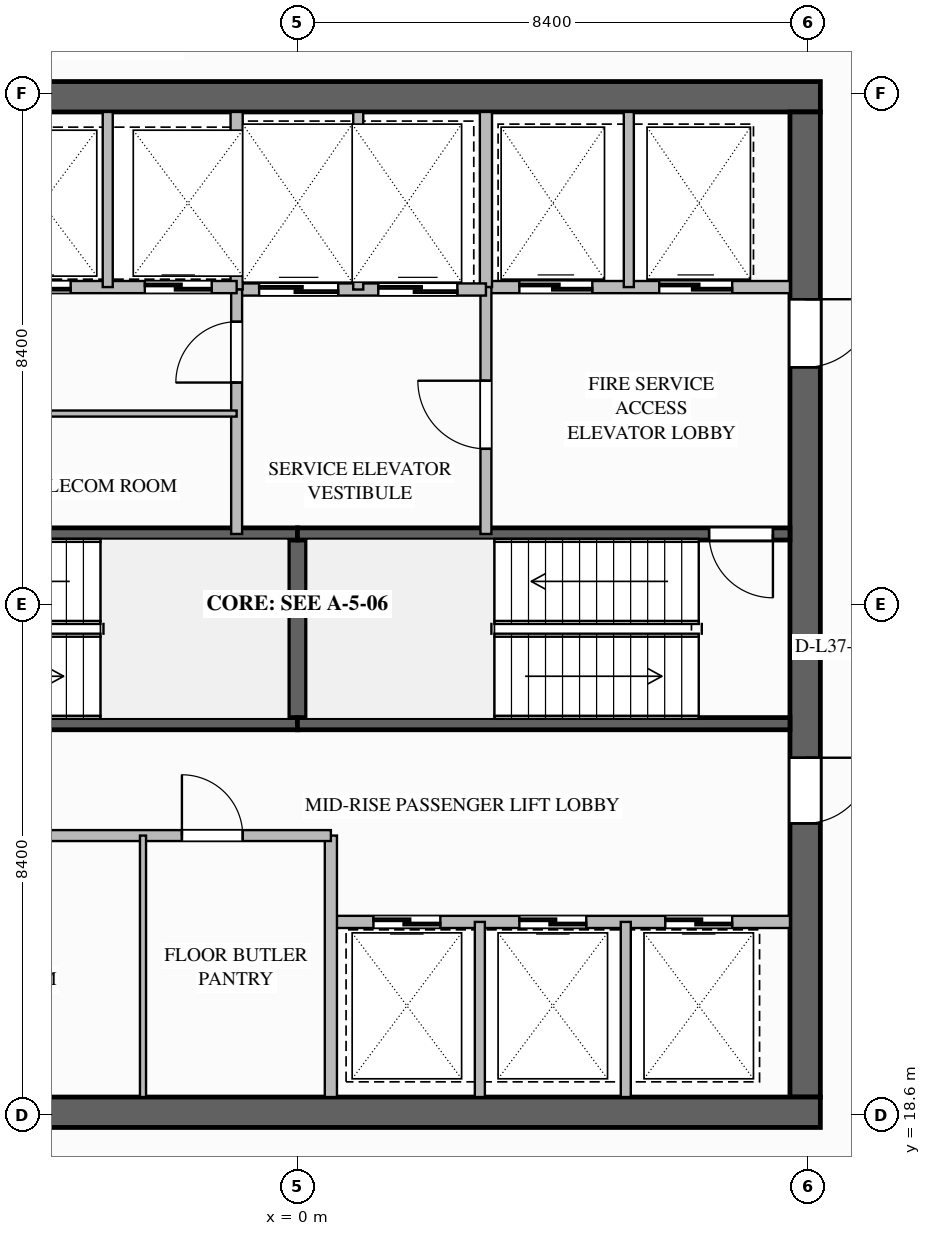
"""IFC4 building model, lengths in metres.
Left out: names, types, materials, properties, quantities, classifications, styles, units other than length and angle.
Written with IfcOpenShell. Run it as: python <this file> out.ifc"""

import sys

from ifc_helpers import new_model, si_unit, direction, frame, frame_2d, origin, place, context, subcontext, project, spatial, rectangle, extrude, element, fill, save


model = new_model("IFC4")
c1 = context("Model", 3, precision=1e-05, world=origin(), true_north=direction((0.0, 1.0)))
c2 = subcontext(c1, "Body", "Model", "MODEL_VIEW")
j1 = project(units=[si_unit("LENGTHUNIT", "METRE"), si_unit("PLANEANGLEUNIT", "RADIAN")], contexts=[c1])
p1 = place(None, origin())
s1 = spatial("IfcSite", under=j1, at=p1, CompositionType="ELEMENT")
p2 = place(p1, origin())
s2 = spatial("IfcBuilding", under=s1, at=p2, CompositionType="ELEMENT")
p3 = place(p2, frame((0.0, 0.0, 145.8)))
s3 = spatial("IfcBuildingStorey", under=s2, at=p3, CompositionType="ELEMENT", Elevation=145.8)
p4 = place(p3, frame((-8.6, 35.35, 0.0), z_axis=(0.0, 0.0, 1.0), x_axis=(1.0, 0.0, 0.0)))
e1 = element("IfcWall", 1, at=p4, inside=s3, PredefinedType="SHEAR", context=c2, shape_type="SweptSolid", body=[
    extrude(rectangle(XDim=17.2, YDim=0.5, at=frame_2d((8.6, 0.0))), origin(), (0.0, 0.0, 1.0), 4.6),
])
p5 = place(p3, frame((8.35, 35.1, 0.0), z_axis=(0.0, 0.0, 1.0), x_axis=(0.0, -1.0, 0.0)))
e2 = element("IfcWall", 2, at=p5, inside=s3, PredefinedType="SHEAR", context=c2, shape_type="SweptSolid", body=[
    extrude(rectangle(XDim=16.2, YDim=0.5, at=frame_2d((8.1, 0.0))), origin(), (0.0, 0.0, 1.0), 4.6),
])
p6 = place(p5, frame((3.08, 0.0, 0.0)))
e3 = element("IfcOpeningElement", 3, at=p6, cuts=e2, PredefinedType="OPENING", context=c2, shape_type="SweptSolid", body=[
    extrude(rectangle(XDim=1.12, YDim=2.1, at=frame_2d((0.56, 1.05))), frame((0.0, 0.26, 0.0), z_axis=(0.0, -1.0, 0.0), x_axis=(1.0, 0.0, 0.0)), (0.0, 0.0, 1.0), 0.52),
])
p7 = place(p5, frame((10.62, 0.0, 0.0)))
e4 = element("IfcOpeningElement", 4, at=p7, cuts=e2, PredefinedType="OPENING", context=c2, shape_type="SweptSolid", body=[
    extrude(rectangle(XDim=1.08, YDim=2.04, at=frame_2d((0.54, 1.02))), frame((0.0, 0.26, 0.0), z_axis=(0.0, -1.0, 0.0), x_axis=(1.0, 0.0, 0.0)), (0.0, 0.0, 1.0), 0.52),
])
p8 = place(p3, frame((8.6, 18.65, 0.0), z_axis=(0.0, 0.0, 1.0), x_axis=(-1.0, 0.0, 0.0)))
e5 = element("IfcWall", 5, at=p8, inside=s3, PredefinedType="SHEAR", context=c2, shape_type="SweptSolid", body=[
    extrude(rectangle(XDim=17.2, YDim=0.5, at=frame_2d((8.6, 0.0))), origin(), (0.0, 0.0, 1.0), 4.6),
])
p9 = place(p3, frame((0.0, 25.04, 0.0), z_axis=(0.0, 0.0, 1.0), x_axis=(0.0, 1.0, 0.0)))
e6 = element("IfcWall", 6, at=p9, inside=s3, PredefinedType="SOLIDWALL", context=c2, shape_type="SweptSolid", body=[
    extrude(rectangle(XDim=3.12, YDim=0.3, at=frame_2d((1.56, 0.0))), origin(), (0.0, 0.0, 1.0), 4.34),
])
p10 = place(p3, frame((-8.1, 25.04, 0.0), z_axis=(0.0, 0.0, 1.0), x_axis=(1.0, 0.0, 0.0)))
e7 = element("IfcWall", 7, at=p10, inside=s3, PredefinedType="SOLIDWALL", context=c2, shape_type="SweptSolid", body=[
    extrude(rectangle(XDim=8.1, YDim=0.2, at=frame_2d((4.05, 0.0))), origin(), (0.0, 0.0, 1.0), 4.34),
])
p11 = place(p10, frame((0.28, 0.0, 0.0)))
e8 = element("IfcOpeningElement", 8, at=p11, cuts=e7, PredefinedType="OPENING", context=c2, shape_type="SweptSolid", body=[
    extrude(rectangle(XDim=1.05, YDim=2.1, at=frame_2d((0.525, 1.05))), frame((0.0, 0.11, 0.0), z_axis=(0.0, -1.0, 0.0), x_axis=(1.0, 0.0, 0.0)), (0.0, 0.0, 1.0), 0.22),
])
for number, where, z_axis, x_axis in (
    (9, (-8.1, 28.16, 0.0), (0.0, 0.0, 1.0), (1.0, 0.0, 0.0)),
    (10, (0.0, 25.04, 0.0), (0.0, 0.0, 1.0), (1.0, 0.0, 0.0)),
):
    element("IfcWall", number, at=place(p3, frame(where, z_axis=z_axis, x_axis=x_axis)), inside=s3, PredefinedType="SOLIDWALL", context=c2, shape_type="SweptSolid", body=[
        extrude(rectangle(XDim=8.1, YDim=0.2, at=frame_2d((4.05, 0.0))), origin(), (0.0, 0.0, 1.0), 4.34),
    ])
p12 = place(p3, frame((8.1, 28.16, 0.0), z_axis=(0.0, 0.0, 1.0), x_axis=(-1.0, 0.0, 0.0)))
e11 = element("IfcWall", 11, at=p12, inside=s3, PredefinedType="SOLIDWALL", context=c2, shape_type="SweptSolid", body=[
    extrude(rectangle(XDim=8.1, YDim=0.2, at=frame_2d((4.05, 0.0))), origin(), (0.0, 0.0, 1.0), 4.34),
])
p13 = place(p12, frame((0.28, 0.0, 0.0)))
e12 = element("IfcOpeningElement", 12, at=p13, cuts=e11, PredefinedType="OPENING", context=c2, shape_type="SweptSolid", body=[
    extrude(rectangle(XDim=1.05, YDim=2.1, at=frame_2d((0.525, 1.05))), frame((0.0, 0.11, 0.0), z_axis=(0.0, -1.0, 0.0), x_axis=(1.0, 0.0, 0.0)), (0.0, 0.0, 1.0), 0.22),
])
p14 = place(p3, frame((3.1, 32.22, 0.0), z_axis=(0.0, 0.0, 1.0), x_axis=(1.0, 0.0, 0.0)))
e13 = element("IfcWall", 13, at=p14, inside=s3, PredefinedType="SOLIDWALL", context=c2, shape_type="SweptSolid", body=[
    extrude(rectangle(XDim=5.0, YDim=0.2, at=frame_2d((2.5, 0.0))), origin(), (0.0, 0.0, 1.0), 4.34),
])
p15 = place(p14, frame((0.55, 0.0, 0.0)))
e14 = element("IfcOpeningElement", 14, at=p15, cuts=e13, PredefinedType="OPENING", context=c2, shape_type="SweptSolid", body=[
    extrude(rectangle(XDim=1.2, YDim=2.2, at=frame_2d((0.6, 1.1))), frame((0.0, 0.11, 0.0), z_axis=(0.0, -1.0, 0.0), x_axis=(1.0, 0.0, 0.0)), (0.0, 0.0, 1.0), 0.22),
])
p16 = place(p14, frame((2.85, 0.0, 0.0)))
e15 = element("IfcOpeningElement", 15, at=p16, cuts=e13, PredefinedType="OPENING", context=c2, shape_type="SweptSolid", body=[
    extrude(rectangle(XDim=1.2, YDim=2.2, at=frame_2d((0.6, 1.1))), frame((0.0, 0.11, 0.0), z_axis=(0.0, -1.0, 0.0), x_axis=(1.0, 0.0, 0.0)), (0.0, 0.0, 1.0), 0.22),
])
p17 = place(p3, frame((3.1, 32.22, 0.0), z_axis=(0.0, 0.0, 1.0), x_axis=(0.0, 1.0, 0.0)))
e16 = element("IfcWall", 16, at=p17, inside=s3, PredefinedType="SOLIDWALL", context=c2, shape_type="SweptSolid", body=[
    extrude(rectangle(XDim=2.88, YDim=0.2, at=frame_2d((1.44, 0.0))), origin(), (0.0, 0.0, 1.0), 4.34),
])
p18 = place(p3, frame((5.45, 32.22, 0.0), z_axis=(0.0, 0.0, 1.0), x_axis=(0.0, 1.0, 0.0)))
e17 = element("IfcWall", 17, at=p18, inside=s3, PredefinedType="PARTITIONING", context=c2, shape_type="SweptSolid", body=[
    extrude(rectangle(XDim=2.88, YDim=0.165, at=frame_2d((1.44, 0.0))), origin(), (0.0, 0.0, 1.0), 4.34),
])
p19 = place(p3, frame((3.1, 28.16, 0.0), z_axis=(0.0, 0.0, 1.0), x_axis=(0.0, 1.0, 0.0)))
e18 = element("IfcWall", 18, at=p19, inside=s3, PredefinedType="SOLIDWALL", context=c2, shape_type="SweptSolid", body=[
    extrude(rectangle(XDim=4.06, YDim=0.18, at=frame_2d((2.03, 0.0))), origin(), (0.0, 0.0, 1.0), 4.34),
])
p20 = place(p19, frame((1.4, 0.0, 0.0)))
e19 = element("IfcOpeningElement", 19, at=p20, cuts=e18, PredefinedType="OPENING", context=c2, shape_type="SweptSolid", body=[
    extrude(rectangle(XDim=1.12, YDim=2.1, at=frame_2d((0.56, 1.05))), frame((0.0, 0.1, 0.0), z_axis=(0.0, -1.0, 0.0), x_axis=(1.0, 0.0, 0.0)), (0.0, 0.0, 1.0), 0.2),
])
p21 = place(p3, frame((-1.0, 32.18, 0.0), z_axis=(0.0, 0.0, 1.0), x_axis=(1.0, 0.0, 0.0)))
e20 = element("IfcWall", 20, at=p21, inside=s3, PredefinedType="SOLIDWALL", context=c2, shape_type="SweptSolid", body=[
    extrude(rectangle(XDim=4.1, YDim=0.2, at=frame_2d((2.05, 0.0))), origin(), (0.0, 0.0, 1.0), 4.34),
])
p22 = place(p21, frame((0.37, 0.0, 0.0)))
e21 = element("IfcOpeningElement", 21, at=p22, cuts=e20, PredefinedType="OPENING", context=c2, shape_type="SweptSolid", body=[
    extrude(rectangle(XDim=1.3, YDim=2.2, at=frame_2d((0.65, 1.1))), frame((0.0, 0.11, 0.0), z_axis=(0.0, -1.0, 0.0), x_axis=(1.0, 0.0, 0.0)), (0.0, 0.0, 1.0), 0.22),
])
p23 = place(p21, frame((2.33, 0.0, 0.0)))
e22 = element("IfcOpeningElement", 22, at=p23, cuts=e20, PredefinedType="OPENING", context=c2, shape_type="SweptSolid", body=[
    extrude(rectangle(XDim=1.3, YDim=2.2, at=frame_2d((0.65, 1.1))), frame((0.0, 0.11, 0.0), z_axis=(0.0, -1.0, 0.0), x_axis=(1.0, 0.0, 0.0)), (0.0, 0.0, 1.0), 0.22),
])
p24 = place(p3, frame((-1.0, 32.18, 0.0), z_axis=(0.0, 0.0, 1.0), x_axis=(0.0, 1.0, 0.0)))
e23 = element("IfcWall", 23, at=p24, inside=s3, PredefinedType="SOLIDWALL", context=c2, shape_type="SweptSolid", body=[
    extrude(rectangle(XDim=2.92, YDim=0.2, at=frame_2d((1.46, 0.0))), origin(), (0.0, 0.0, 1.0), 4.34),
])
p25 = place(p3, frame((1.0, 32.18, 0.0), z_axis=(0.0, 0.0, 1.0), x_axis=(0.0, 1.0, 0.0)))
e24 = element("IfcWall", 24, at=p25, inside=s3, PredefinedType="PARTITIONING", context=c2, shape_type="SweptSolid", body=[
    extrude(rectangle(XDim=2.92, YDim=0.165, at=frame_2d((1.46, 0.0))), origin(), (0.0, 0.0, 1.0), 4.34),
])
p26 = place(p3, frame((-1.0, 28.16, 0.0), z_axis=(0.0, 0.0, 1.0), x_axis=(0.0, 1.0, 0.0)))
e25 = element("IfcWall", 25, at=p26, inside=s3, PredefinedType="SOLIDWALL", context=c2, shape_type="SweptSolid", body=[
    extrude(rectangle(XDim=4.02, YDim=0.18, at=frame_2d((2.01, 0.0))), origin(), (0.0, 0.0, 1.0), 4.34),
])
p27 = place(p26, frame((2.49, 0.0, 0.0)))
e26 = element("IfcOpeningElement", 26, at=p27, cuts=e25, PredefinedType="OPENING", context=c2, shape_type="SweptSolid", body=[
    extrude(rectangle(XDim=1.0, YDim=2.1, at=frame_2d((0.5, 1.05))), frame((0.0, 0.1, 0.0), z_axis=(0.0, -1.0, 0.0), x_axis=(1.0, 0.0, 0.0)), (0.0, 0.0, 1.0), 0.2),
])
p28 = place(p3, frame((-8.1, 32.22, 0.0), z_axis=(0.0, 0.0, 1.0), x_axis=(1.0, 0.0, 0.0)))
e27 = element("IfcWall", 27, at=p28, inside=s3, PredefinedType="SOLIDWALL", context=c2, shape_type="SweptSolid", body=[
    extrude(rectangle(XDim=7.1, YDim=0.2, at=frame_2d((3.55, 0.0))), origin(), (0.0, 0.0, 1.0), 4.34),
])
p29 = place(p28, frame((0.95, 0.0, 0.0)))
e28 = element("IfcOpeningElement", 28, at=p29, cuts=e27, PredefinedType="OPENING", context=c2, shape_type="SweptSolid", body=[
    extrude(rectangle(XDim=1.1, YDim=2.2, at=frame_2d((0.55, 1.1))), frame((0.0, 0.11, 0.0), z_axis=(0.0, -1.0, 0.0), x_axis=(1.0, 0.0, 0.0)), (0.0, 0.0, 1.0), 0.22),
])
p30 = place(p28, frame((3.27, 0.0, 0.0)))
e29 = element("IfcOpeningElement", 29, at=p30, cuts=e27, PredefinedType="OPENING", context=c2, shape_type="SweptSolid", body=[
    extrude(rectangle(XDim=1.1, YDim=2.2, at=frame_2d((0.55, 1.1))), frame((0.0, 0.11, 0.0), z_axis=(0.0, -1.0, 0.0), x_axis=(1.0, 0.0, 0.0)), (0.0, 0.0, 1.0), 0.22),
])
p31 = place(p28, frame((5.59, 0.0, 0.0)))
e30 = element("IfcOpeningElement", 30, at=p31, cuts=e27, PredefinedType="OPENING", context=c2, shape_type="SweptSolid", body=[
    extrude(rectangle(XDim=1.1, YDim=2.2, at=frame_2d((0.55, 1.1))), frame((0.0, 0.11, 0.0), z_axis=(0.0, -1.0, 0.0), x_axis=(1.0, 0.0, 0.0)), (0.0, 0.0, 1.0), 0.22),
])
p32 = place(p3, frame((-3.12, 32.22, 0.0), z_axis=(0.0, 0.0, 1.0), x_axis=(0.0, 1.0, 0.0)))
e31 = element("IfcWall", 31, at=p32, inside=s3, PredefinedType="PARTITIONING", context=c2, shape_type="SweptSolid", body=[
    extrude(rectangle(XDim=2.88, YDim=0.165, at=frame_2d((1.44, 0.0))), origin(), (0.0, 0.0, 1.0), 4.34),
])
p33 = place(p3, frame((-8.1, 30.14, 0.0), z_axis=(0.0, 0.0, 1.0), x_axis=(1.0, 0.0, 0.0)))
e32 = element("IfcWall", 32, at=p33, inside=s3, PredefinedType="PARTITIONING", context=c2, shape_type="SweptSolid", body=[
    extrude(rectangle(XDim=7.1, YDim=0.1, at=frame_2d((3.55, 0.0))), origin(), (0.0, 0.0, 1.0), 4.34),
])
p34 = place(p33, frame((2.8, 0.0, 0.0)))
e33 = element("IfcOpeningElement", 33, at=p34, cuts=e32, PredefinedType="OPENING", context=c2, shape_type="SweptSolid", body=[
    extrude(rectangle(XDim=0.92, YDim=2.1, at=frame_2d((0.46, 1.05))), frame((0.0, 0.06, 0.0), z_axis=(0.0, -1.0, 0.0), x_axis=(1.0, 0.0, 0.0)), (0.0, 0.0, 1.0), 0.12),
])
p35 = place(p3, frame((8.1, 21.78, 0.0), z_axis=(0.0, 0.0, 1.0), x_axis=(-1.0, 0.0, 0.0)))
e34 = element("IfcWall", 34, at=p35, inside=s3, PredefinedType="SOLIDWALL", context=c2, shape_type="SweptSolid", body=[
    extrude(rectangle(XDim=7.55, YDim=0.2, at=frame_2d((3.775, 0.0))), origin(), (0.0, 0.0, 1.0), 4.34),
])
p36 = place(p35, frame((5.75, 0.0, 0.0)))
e35 = element("IfcOpeningElement", 35, at=p36, cuts=e34, PredefinedType="OPENING", context=c2, shape_type="SweptSolid", body=[
    extrude(rectangle(XDim=1.1, YDim=2.2, at=frame_2d((0.55, 1.1))), frame((0.0, 0.11, 0.0), z_axis=(0.0, -1.0, 0.0), x_axis=(1.0, 0.0, 0.0)), (0.0, 0.0, 1.0), 0.22),
])
p37 = place(p35, frame((3.35, 0.0, 0.0)))
e36 = element("IfcOpeningElement", 36, at=p37, cuts=e34, PredefinedType="OPENING", context=c2, shape_type="SweptSolid", body=[
    extrude(rectangle(XDim=1.1, YDim=2.2, at=frame_2d((0.55, 1.1))), frame((0.0, 0.11, 0.0), z_axis=(0.0, -1.0, 0.0), x_axis=(1.0, 0.0, 0.0)), (0.0, 0.0, 1.0), 0.22),
])
p38 = place(p35, frame((0.95, 0.0, 0.0)))
e37 = element("IfcOpeningElement", 37, at=p38, cuts=e34, PredefinedType="OPENING", context=c2, shape_type="SweptSolid", body=[
    extrude(rectangle(XDim=1.1, YDim=2.2, at=frame_2d((0.55, 1.1))), frame((0.0, 0.11, 0.0), z_axis=(0.0, -1.0, 0.0), x_axis=(1.0, 0.0, 0.0)), (0.0, 0.0, 1.0), 0.22),
])
p39 = place(p3, frame((0.55, 18.9, 0.0), z_axis=(0.0, 0.0, 1.0), x_axis=(0.0, 1.0, 0.0)))
e38 = element("IfcWall", 38, at=p39, inside=s3, PredefinedType="SOLIDWALL", context=c2, shape_type="SweptSolid", body=[
    extrude(rectangle(XDim=4.3, YDim=0.2, at=frame_2d((2.15, 0.0))), origin(), (0.0, 0.0, 1.0), 4.34),
])
for number, where, z_axis, x_axis in (
    (39, (3.0, 18.9, 0.0), (0.0, 0.0, 1.0), (0.0, 1.0, 0.0)),
    (40, (5.4, 18.9, 0.0), (0.0, 0.0, 1.0), (0.0, 1.0, 0.0)),
):
    element("IfcWall", number, at=place(p3, frame(where, z_axis=z_axis, x_axis=x_axis)), inside=s3, PredefinedType="PARTITIONING", context=c2, shape_type="SweptSolid", body=[
        extrude(rectangle(XDim=2.88, YDim=0.165, at=frame_2d((1.44, 0.0))), origin(), (0.0, 0.0, 1.0), 4.34),
    ])
p40 = place(p3, frame((-8.1, 23.2, 0.0), z_axis=(0.0, 0.0, 1.0), x_axis=(1.0, 0.0, 0.0)))
e41 = element("IfcWall", 41, at=p40, inside=s3, PredefinedType="SOLIDWALL", context=c2, shape_type="SweptSolid", body=[
    extrude(rectangle(XDim=8.65, YDim=0.18, at=frame_2d((4.325, 0.0))), origin(), (0.0, 0.0, 1.0), 4.34),
])
p41 = place(p40, frame((1.6, 0.0, 0.0)))
e42 = element("IfcOpeningElement", 42, at=p41, cuts=e41, PredefinedType="OPENING", context=c2, shape_type="SweptSolid", body=[
    extrude(rectangle(XDim=1.0, YDim=2.1, at=frame_2d((0.5, 1.05))), frame((0.0, 0.1, 0.0), z_axis=(0.0, -1.0, 0.0), x_axis=(1.0, 0.0, 0.0)), (0.0, 0.0, 1.0), 0.2),
])
p42 = place(p40, frame((6.2, 0.0, 0.0)))
e43 = element("IfcOpeningElement", 43, at=p42, cuts=e41, PredefinedType="OPENING", context=c2, shape_type="SweptSolid", body=[
    extrude(rectangle(XDim=1.0, YDim=2.1, at=frame_2d((0.5, 1.05))), frame((0.0, 0.1, 0.0), z_axis=(0.0, -1.0, 0.0), x_axis=(1.0, 0.0, 0.0)), (0.0, 0.0, 1.0), 0.2),
])
p43 = place(p3, frame((-2.54, 18.9, 0.0), z_axis=(0.0, 0.0, 1.0), x_axis=(0.0, 1.0, 0.0)))
e44 = element("IfcWall", 44, at=p43, inside=s3, PredefinedType="PARTITIONING", context=c2, shape_type="SweptSolid", body=[
    extrude(rectangle(XDim=4.3, YDim=0.1, at=frame_2d((2.15, 0.0))), origin(), (0.0, 0.0, 1.0), 4.34),
])
p44 = place(p13, origin())
e45 = element("IfcDoor", 45, at=p44, inside=s3, OperationType="SINGLE_SWING_LEFT", PredefinedType="DOOR", context=c2, shape_type="SweptSolid", body=[
    extrude(rectangle(XDim=1.05, YDim=2.1, at=frame_2d((0.525, 1.05))), frame((0.0, 0.025, 0.0), z_axis=(0.0, -1.0, 0.0), x_axis=(1.0, 0.0, 0.0)), (0.0, 0.0, 1.0), 0.05),
])
fill(e12, e45)
p45 = place(p15, origin())
e46 = element("IfcDoor", 46, at=p45, inside=s3, OperationType="SLIDING_TO_LEFT", PredefinedType="DOOR", context=c2, shape_type="SweptSolid", body=[
    extrude(rectangle(XDim=1.2, YDim=2.2, at=frame_2d((0.6, 1.1))), frame((0.0, 0.025, 0.0), z_axis=(0.0, -1.0, 0.0), x_axis=(1.0, 0.0, 0.0)), (0.0, 0.0, 1.0), 0.05),
])
fill(e14, e46)
p46 = place(p16, origin())
e47 = element("IfcDoor", 47, at=p46, inside=s3, OperationType="SLIDING_TO_LEFT", PredefinedType="DOOR", context=c2, shape_type="SweptSolid", body=[
    extrude(rectangle(XDim=1.2, YDim=2.2, at=frame_2d((0.6, 1.1))), frame((0.0, 0.025, 0.0), z_axis=(0.0, -1.0, 0.0), x_axis=(1.0, 0.0, 0.0)), (0.0, 0.0, 1.0), 0.05),
])
fill(e15, e47)
p47 = place(p20, origin())
e48 = element("IfcDoor", 48, at=p47, inside=s3, OperationType="SINGLE_SWING_RIGHT", PredefinedType="DOOR", context=c2, shape_type="SweptSolid", body=[
    extrude(rectangle(XDim=1.12, YDim=2.1, at=frame_2d((0.56, 1.05))), frame((0.0, 0.025, 0.0), z_axis=(0.0, -1.0, 0.0), x_axis=(1.0, 0.0, 0.0)), (0.0, 0.0, 1.0), 0.05),
])
fill(e19, e48)
p48 = place(p6, origin())
e49 = element("IfcDoor", 49, at=p48, inside=s3, OperationType="SINGLE_SWING_LEFT", PredefinedType="DOOR", context=c2, shape_type="SweptSolid", body=[
    extrude(rectangle(XDim=1.12, YDim=2.1, at=frame_2d((0.56, 1.05))), frame((0.0, 0.025, 0.0), z_axis=(0.0, -1.0, 0.0), x_axis=(1.0, 0.0, 0.0)), (0.0, 0.0, 1.0), 0.05),
])
fill(e3, e49)
p49 = place(p22, origin())
e50 = element("IfcDoor", 50, at=p49, inside=s3, OperationType="SLIDING_TO_LEFT", PredefinedType="DOOR", context=c2, shape_type="SweptSolid", body=[
    extrude(rectangle(XDim=1.3, YDim=2.2, at=frame_2d((0.65, 1.1))), frame((0.0, 0.025, 0.0), z_axis=(0.0, -1.0, 0.0), x_axis=(1.0, 0.0, 0.0)), (0.0, 0.0, 1.0), 0.05),
])
fill(e21, e50)
p50 = place(p23, origin())
e51 = element("IfcDoor", 51, at=p50, inside=s3, OperationType="SLIDING_TO_LEFT", PredefinedType="DOOR", context=c2, shape_type="SweptSolid", body=[
    extrude(rectangle(XDim=1.3, YDim=2.2, at=frame_2d((0.65, 1.1))), frame((0.0, 0.025, 0.0), z_axis=(0.0, -1.0, 0.0), x_axis=(1.0, 0.0, 0.0)), (0.0, 0.0, 1.0), 0.05),
])
fill(e22, e51)
p51 = place(p27, origin())
e52 = element("IfcDoor", 52, at=p51, inside=s3, OperationType="SINGLE_SWING_LEFT", PredefinedType="DOOR", context=c2, shape_type="SweptSolid", body=[
    extrude(rectangle(XDim=1.0, YDim=2.1, at=frame_2d((0.5, 1.05))), frame((0.0, 0.025, 0.0), z_axis=(0.0, -1.0, 0.0), x_axis=(1.0, 0.0, 0.0)), (0.0, 0.0, 1.0), 0.05),
])
fill(e26, e52)
p52 = place(p30, origin())
e53 = element("IfcDoor", 53, at=p52, inside=s3, OperationType="SLIDING_TO_LEFT", PredefinedType="DOOR", context=c2, shape_type="SweptSolid", body=[
    extrude(rectangle(XDim=1.1, YDim=2.2, at=frame_2d((0.55, 1.1))), frame((0.0, 0.025, 0.0), z_axis=(0.0, -1.0, 0.0), x_axis=(1.0, 0.0, 0.0)), (0.0, 0.0, 1.0), 0.05),
])
fill(e29, e53)
p53 = place(p31, origin())
e54 = element("IfcDoor", 54, at=p53, inside=s3, OperationType="SLIDING_TO_LEFT", PredefinedType="DOOR", context=c2, shape_type="SweptSolid", body=[
    extrude(rectangle(XDim=1.1, YDim=2.2, at=frame_2d((0.55, 1.1))), frame((0.0, 0.025, 0.0), z_axis=(0.0, -1.0, 0.0), x_axis=(1.0, 0.0, 0.0)), (0.0, 0.0, 1.0), 0.05),
])
fill(e30, e54)
p54 = place(p36, origin())
e55 = element("IfcDoor", 55, at=p54, inside=s3, OperationType="SLIDING_TO_LEFT", PredefinedType="DOOR", context=c2, shape_type="SweptSolid", body=[
    extrude(rectangle(XDim=1.1, YDim=2.2, at=frame_2d((0.55, 1.1))), frame((0.0, 0.025, 0.0), z_axis=(0.0, -1.0, 0.0), x_axis=(1.0, 0.0, 0.0)), (0.0, 0.0, 1.0), 0.05),
])
fill(e35, e55)
p55 = place(p37, origin())
e56 = element("IfcDoor", 56, at=p55, inside=s3, OperationType="SLIDING_TO_LEFT", PredefinedType="DOOR", context=c2, shape_type="SweptSolid", body=[
    extrude(rectangle(XDim=1.1, YDim=2.2, at=frame_2d((0.55, 1.1))), frame((0.0, 0.025, 0.0), z_axis=(0.0, -1.0, 0.0), x_axis=(1.0, 0.0, 0.0)), (0.0, 0.0, 1.0), 0.05),
])
fill(e36, e56)
p56 = place(p38, origin())
e57 = element("IfcDoor", 57, at=p56, inside=s3, OperationType="SLIDING_TO_LEFT", PredefinedType="DOOR", context=c2, shape_type="SweptSolid", body=[
    extrude(rectangle(XDim=1.1, YDim=2.2, at=frame_2d((0.55, 1.1))), frame((0.0, 0.025, 0.0), z_axis=(0.0, -1.0, 0.0), x_axis=(1.0, 0.0, 0.0)), (0.0, 0.0, 1.0), 0.05),
])
fill(e37, e57)
p57 = place(p7, origin())
e58 = element("IfcDoor", 58, at=p57, inside=s3, OperationType="SINGLE_SWING_LEFT", PredefinedType="DOOR", context=c2, shape_type="SweptSolid", body=[
    extrude(rectangle(XDim=1.08, YDim=2.04, at=frame_2d((0.54, 1.02))), frame((0.0, 0.025, 0.0), z_axis=(0.0, -1.0, 0.0), x_axis=(1.0, 0.0, 0.0)), (0.0, 0.0, 1.0), 0.05),
])
fill(e4, e58)
p58 = place(p42, origin())
e59 = element("IfcDoor", 59, at=p58, inside=s3, OperationType="SINGLE_SWING_LEFT", PredefinedType="DOOR", context=c2, shape_type="SweptSolid", body=[
    extrude(rectangle(XDim=1.0, YDim=2.1, at=frame_2d((0.5, 1.05))), frame((0.0, 0.025, 0.0), z_axis=(0.0, -1.0, 0.0), x_axis=(1.0, 0.0, 0.0)), (0.0, 0.0, 1.0), 0.05),
])
fill(e43, e59)
save(model, sys.argv[1])
